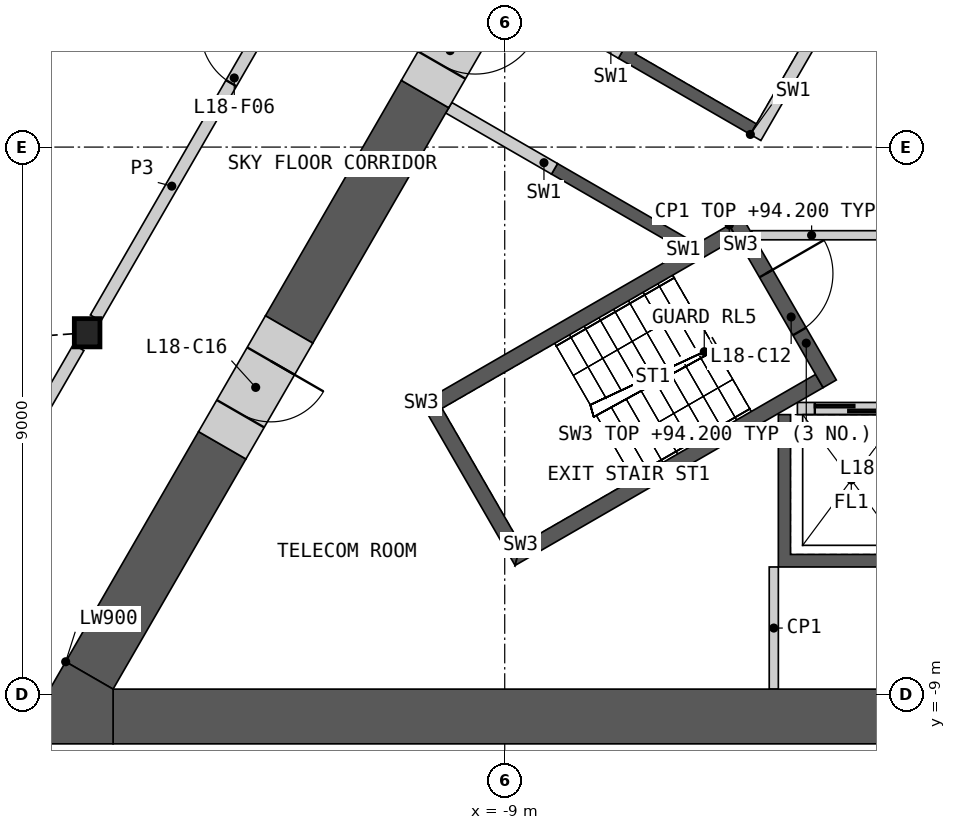
"""IFC4 building model, lengths in metres.
Left out: names, types, materials, properties, quantities, classifications, styles, units other than length and angle.
Written with IfcOpenShell. Run it as: python <this file> out.ifc"""

import sys

from ifc_helpers import new_model, si_unit, direction, frame, frame_2d, origin, origin_2d, place, context, subcontext, project, spatial, polyline, rectangle, i_section, outline, extrude, element, fill, save


model = new_model("IFC4")
c1 = context("Model", 3, precision=1e-05, world=origin(), true_north=direction((0.0, 1.0)))
c2 = subcontext(c1, "Body", "Model", "MODEL_VIEW")
j1 = project(units=[si_unit("LENGTHUNIT", "METRE"), si_unit("PLANEANGLEUNIT", "RADIAN")], contexts=[c1])
p1 = place(None, origin())
s1 = spatial("IfcSite", under=j1, at=p1, CompositionType="ELEMENT")
p2 = place(p1, origin())
s2 = spatial("IfcBuilding", under=s1, at=p2, CompositionType="ELEMENT")
p3 = place(p2, frame((0.0, 0.0, 84.6)))
s3 = spatial("IfcBuildingStorey", under=s2, at=p3, CompositionType="ELEMENT", Elevation=84.6)
p4 = place(p3, frame((-15.868, -3.054, 0.0), z_axis=(0.0, 0.0, 1.0), x_axis=(1.0, 0.0, 0.0)))
e1 = element("IfcColumn", 1, at=p4, inside=s3, PredefinedType="COLUMN", context=c2, shape_type="SweptSolid", body=[
    extrude(i_section(OverallWidth=0.421, OverallDepth=0.465, WebThickness=0.045, FlangeThickness=0.072, at=origin_2d()), origin(), (0.0, 0.0, 1.0), 10.0),
])
p5 = place(p3, origin())
e2 = element("IfcWall", 2, at=p5, inside=s3, PredefinedType="SHEAR", context=c2, shape_type="SweptSolid", body=[
    extrude(outline(polyline([(4.5, -4.4), (4.5, -6.906), (-4.5, -6.906), (-4.5, -4.4), (-4.3, -4.4), (-4.3, -6.7), (-2.3, -6.7), (-2.3, -4.4), (-2.1, -4.4), (-2.1, -6.7), (-0.1, -6.7), (-0.1, -4.4), (0.1, -4.4), (0.1, -6.7), (2.1, -6.7), (2.1, -4.4), (2.3, -4.4), (2.3, -6.7), (4.3, -6.7), (4.3, -4.4), (4.5, -4.4)])), origin(), (0.0, 0.0, 1.0), 9.6),
])
p6 = place(p3, frame((-4.187, -4.3, 0.0), z_axis=(0.0, 0.0, 1.0), x_axis=(1.0, 0.0, 0.0)))
e3 = element("IfcWall", 3, at=p6, inside=s3, PredefinedType="SOLIDWALL", context=c2, shape_type="SweptSolid", body=[
    extrude(rectangle(XDim=8.373, YDim=0.2, at=frame_2d((4.187, 0.0))), origin(), (0.0, 0.0, 1.0), 9.6),
])
p7 = place(p6, frame((0.287, 0.0, 0.0)))
e4 = element("IfcOpeningElement", 4, at=p7, cuts=e3, PredefinedType="OPENING", context=c2, shape_type="SweptSolid", body=[
    extrude(rectangle(XDim=1.2, YDim=2.1, at=frame_2d((0.6, 1.05))), frame((0.0, 0.11, 0.0), z_axis=(0.0, -1.0, 0.0), x_axis=(1.0, 0.0, 0.0)), (0.0, 0.0, 1.0), 0.22),
])
p8 = place(p6, frame((2.387, 0.0, 0.0)))
e5 = element("IfcOpeningElement", 5, at=p8, cuts=e3, PredefinedType="OPENING", context=c2, shape_type="SweptSolid", body=[
    extrude(rectangle(XDim=1.4, YDim=2.1, at=frame_2d((0.7, 1.05))), frame((0.0, 0.11, 0.0), z_axis=(0.0, -1.0, 0.0), x_axis=(1.0, 0.0, 0.0)), (0.0, 0.0, 1.0), 0.22),
])
p9 = place(p6, frame((4.737, 0.0, 0.0)))
e6 = element("IfcOpeningElement", 6, at=p9, cuts=e3, PredefinedType="OPENING", context=c2, shape_type="SweptSolid", body=[
    extrude(rectangle(XDim=1.1, YDim=2.1, at=frame_2d((0.55, 1.05))), frame((0.0, 0.11, 0.0), z_axis=(0.0, -1.0, 0.0), x_axis=(1.0, 0.0, 0.0)), (0.0, 0.0, 1.0), 0.22),
])
p10 = place(p6, frame((6.887, 0.0, 0.0)))
e7 = element("IfcOpeningElement", 7, at=p10, cuts=e3, PredefinedType="OPENING", context=c2, shape_type="SweptSolid", body=[
    extrude(rectangle(XDim=1.2, YDim=2.1, at=frame_2d((0.6, 1.05))), frame((0.0, 0.11, 0.0), z_axis=(0.0, -1.0, 0.0), x_axis=(1.0, 0.0, 0.0)), (0.0, 0.0, 1.0), 0.22),
])
p11 = place(p3, origin())
e8 = element("IfcWall", 8, at=p11, inside=s3, PredefinedType="SHEAR", context=c2, shape_type="SweptSolid", body=[
    extrude(outline(polyline([(-6.061, -1.697), (-8.231, -0.444), (-8.131, -0.271), (-5.96, -1.524), (-6.061, -1.697)])), origin(), (0.0, 0.0, 1.0), 9.6),
])
p12 = place(p3, origin())
e9 = element("IfcWall", 9, at=p12, inside=s3, PredefinedType="SHEAR", context=c2, shape_type="SweptSolid", body=[
    extrude(outline(polyline([(-4.96, 0.208), (-7.131, 1.461), (-5.931, 3.54), (-3.76, 2.287), (-3.861, 2.113), (-5.852, 3.263), (-6.852, 1.531), (-4.861, 0.381), (-4.96, 0.208)])), origin(), (0.0, 0.0, 1.0), 9.6),
])
p13 = place(p3, frame((-1.631, 5.776, 0.0), z_axis=(0.0, 0.0, 1.0), x_axis=(-0.499992876559, -0.866029516466, 0.0)))
e10 = element("IfcWall", 10, at=p13, inside=s3, PredefinedType="SOLIDWALL", context=c2, shape_type="SweptSolid", body=[
    extrude(rectangle(XDim=6.486, YDim=0.2, at=frame_2d((3.243, 0.0))), origin(), (0.0, 0.0, 1.0), 9.6),
])
p14 = place(p13, frame((0.437, 0.0, 0.0)))
e11 = element("IfcOpeningElement", 11, at=p14, cuts=e10, PredefinedType="OPENING", context=c2, shape_type="SweptSolid", body=[
    extrude(rectangle(XDim=0.9, YDim=2.1, at=frame_2d((0.45, 1.05))), frame((0.0, 0.11, 0.0), z_axis=(0.0, -1.0, 0.0), x_axis=(1.0, 0.0, 0.0)), (0.0, 0.0, 1.0), 0.22),
])
p15 = place(p13, frame((2.637, 0.0, 0.0)))
e12 = element("IfcOpeningElement", 12, at=p15, cuts=e10, PredefinedType="OPENING", context=c2, shape_type="SweptSolid", body=[
    extrude(rectangle(XDim=0.9, YDim=2.1, at=frame_2d((0.45, 1.05))), frame((0.0, 0.11, 0.0), z_axis=(0.0, -1.0, 0.0), x_axis=(1.0, 0.0, 0.0)), (0.0, 0.0, 1.0), 0.22),
])
p16 = place(p3, frame((-7.081, 1.548, 0.0), z_axis=(0.0, 0.0, 1.0), x_axis=(-0.865983199114, 0.50007309351, 0.0)))
e13 = element("IfcWall", 13, at=p16, inside=s3, PredefinedType="SHEAR", context=c2, shape_type="SweptSolid", body=[
    extrude(rectangle(XDim=2.009, YDim=0.2, at=frame_2d((1.004, 0.0))), origin(), (0.0, 0.0, 1.0), 9.6),
])
p17 = place(p3, frame((-8.181, -0.357, 0.0), z_axis=(0.0, 0.0, 1.0), x_axis=(-0.866035824272, 0.499981950752, 0.0)))
e14 = element("IfcWall", 14, at=p17, inside=s3, PredefinedType="SHEAR", context=c2, shape_type="SweptSolid", body=[
    extrude(rectangle(XDim=2.009, YDim=0.2, at=frame_2d((1.004, 0.0))), origin(), (0.0, 0.0, 1.0), 9.6),
])
p18 = place(p3, frame((-4.941, -1.45, 0.0), z_axis=(0.0, 0.0, 1.0), x_axis=(1.0, 0.0, 0.0)))
e15 = element("IfcWall", 15, at=p18, inside=s3, PredefinedType="PARTITIONING", context=c2, shape_type="SweptSolid", body=[
    extrude(rectangle(XDim=9.882, YDim=0.15, at=frame_2d((4.941, 0.0))), origin(), (0.0, 0.0, 1.0), 9.6),
])
p19 = place(p18, frame((4.391, 0.0, 0.0)))
e16 = element("IfcOpeningElement", 16, at=p19, cuts=e15, PredefinedType="OPENING", context=c2, shape_type="SweptSolid", body=[
    extrude(rectangle(XDim=1.1, YDim=2.1, at=frame_2d((0.55, 1.05))), frame((0.0, 0.085, 0.0), z_axis=(0.0, -1.0, 0.0), x_axis=(1.0, 0.0, 0.0)), (0.0, 0.0, 1.0), 0.17),
])
p20 = place(p3, origin())
e17 = element("IfcWall", 17, at=p20, inside=s3, PredefinedType="SHEAR", context=c2, shape_type="SweptSolid", body=[
    extrude(outline(polyline([(-5.307, -1.281), (-10.374, -4.206), (-10.032, -4.298), (-5.182, -1.498), (-5.307, -1.281)])), origin(), (0.0, 0.0, 1.0), 9.6),
])
p21 = place(p3, origin())
e18 = element("IfcWall", 18, at=p21, inside=s3, PredefinedType="SHEAR", context=c2, shape_type="SweptSolid", body=[
    extrude(outline(polyline([(-10.374, -4.206), (-8.83, -6.881), (-8.738, -6.539), (-10.032, -4.298), (-10.374, -4.206)])), origin(), (0.0, 0.0, 1.0), 9.6),
])
p22 = place(p3, origin())
e19 = element("IfcWall", 19, at=p22, inside=s3, PredefinedType="SHEAR", context=c2, shape_type="SweptSolid", body=[
    extrude(outline(polyline([(-8.738, -6.539), (-8.83, -6.881), (-3.763, -3.956), (-3.888, -3.739), (-8.738, -6.539)])), origin(), (0.0, 0.0, 1.0), 9.6),
])
p23 = place(p3, frame((-5.199, -1.219, 0.0), z_axis=(0.0, 0.0, 1.0), x_axis=(0.499982516597, -0.866035497597, 0.0)))
e20 = element("IfcWall", 20, at=p23, inside=s3, PredefinedType="SHEAR", context=c2, shape_type="SweptSolid", body=[
    extrude(rectangle(XDim=3.088, YDim=0.25, at=frame_2d((1.544, 0.0))), origin(), (0.0, 0.0, 1.0), 9.6),
])
p24 = place(p23, frame((0.994, 0.0, 0.0)))
e21 = element("IfcOpeningElement", 21, at=p24, cuts=e20, PredefinedType="OPENING", context=c2, shape_type="SweptSolid", body=[
    extrude(rectangle(XDim=1.1, YDim=2.1, at=frame_2d((0.55, 1.05))), frame((0.0, 0.135, 0.0), z_axis=(0.0, -1.0, 0.0), x_axis=(1.0, 0.0, 0.0)), (0.0, 0.0, 1.0), 0.27),
])
p25 = place(p3, frame((-4.575, -6.906, 0.0), z_axis=(0.0, 0.0, 1.0), x_axis=(0.0, -1.0, 0.0)))
e22 = element("IfcWall", 22, at=p25, inside=s3, PredefinedType="PARTITIONING", context=c2, shape_type="SweptSolid", body=[
    extrude(rectangle(XDim=2.009, YDim=0.15, at=frame_2d((1.004, 0.0))), origin(), (0.0, 0.0, 1.0), 9.6),
])
p26 = place(p3, frame((-15.441, -9.365, 0.0), z_axis=(0.0, 0.0, 1.0), x_axis=(1.0, 0.0, 0.0)))
e23 = element("IfcWall", 23, at=p26, inside=s3, PredefinedType="SHEAR", context=c2, shape_type="SweptSolid", body=[
    extrude(rectangle(XDim=14.341, YDim=0.9, at=frame_2d((7.17, 0.0))), origin(), (0.0, 0.0, 1.0), 9.6),
])
p27 = place(p3, frame((-10.31, 0.872, 0.0), z_axis=(0.0, 0.0, 1.0), x_axis=(-0.499991893987, -0.866030083742, 0.0)))
e24 = element("IfcWall", 24, at=p27, inside=s3, PredefinedType="SHEAR", context=c2, shape_type="SweptSolid", body=[
    extrude(rectangle(XDim=4.471, YDim=0.9, at=frame_2d((2.235, 0.0))), origin(), (0.0, 0.0, 1.0), 9.6),
])
p28 = place(p3, frame((-13.646, -4.905, 0.0), z_axis=(0.0, 0.0, 1.0), x_axis=(-0.499990005186, -0.866031174216, 0.0)))
e25 = element("IfcWall", 25, at=p28, inside=s3, PredefinedType="SHEAR", context=c2, shape_type="SweptSolid", body=[
    extrude(rectangle(XDim=4.371, YDim=0.9, at=frame_2d((2.185, 0.0))), origin(), (0.0, 0.0, 1.0), 9.6),
])
p29 = place(p3, origin())
e26 = element("IfcWall", 26, at=p29, inside=s3, PredefinedType="SHEAR", context=c2, shape_type="SweptSolid", body=[
    extrude(outline(polyline([(-16.221, -8.465), (-15.441, -8.915), (-15.441, -9.815), (-17.0, -9.815), (-16.221, -8.465)])), origin(), (0.0, 0.0, 1.0), 9.6),
])
p30 = place(p3, frame((-12.546, -3.0, 0.0), z_axis=(0.0, 0.0, 1.0), x_axis=(-0.499994660107, -0.866028486751, 0.0)))
e27 = element("IfcWall", 27, at=p30, inside=s3, PredefinedType="SHEAR", context=c2, shape_type="SweptSolid", body=[
    extrude(rectangle(XDim=2.2, YDim=0.9, at=frame_2d((1.1, 0.0))), origin(), (0.0, 0.0, 1.0), 9.6),
])
p31 = place(p30, frame((0.6, 0.0, 0.0)))
e28 = element("IfcOpeningElement", 28, at=p31, cuts=e27, PredefinedType="OPENING", context=c2, shape_type="SweptSolid", body=[
    extrude(rectangle(XDim=1.0, YDim=2.1, at=frame_2d((0.5, 1.05))), frame((0.0, 0.46, 0.0), z_axis=(0.0, -1.0, 0.0), x_axis=(1.0, 0.0, 0.0)), (0.0, 0.0, 1.0), 0.92),
])
p32 = place(p3, frame((-9.21, 2.777, 0.0), z_axis=(0.0, 0.0, 1.0), x_axis=(-0.500077893725, -0.86598042715, 0.0)))
e29 = element("IfcWall", 29, at=p32, inside=s3, PredefinedType="SHEAR", context=c2, shape_type="SweptSolid", body=[
    extrude(rectangle(XDim=2.2, YDim=0.9, at=frame_2d((1.1, 0.0))), origin(), (0.0, 0.0, 1.0), 9.6),
])
p33 = place(p32, frame((0.55, 0.0, 0.0)))
e30 = element("IfcOpeningElement", 30, at=p33, cuts=e29, PredefinedType="OPENING", context=c2, shape_type="SweptSolid", body=[
    extrude(rectangle(XDim=1.1, YDim=2.1, at=frame_2d((0.55, 1.05))), frame((0.0, 0.46, 0.0), z_axis=(0.0, -1.0, 0.0), x_axis=(1.0, 0.0, 0.0)), (0.0, 0.0, 1.0), 0.92),
])
p34 = place(p3, frame((-15.728, -2.811, 0.0), z_axis=(0.0, 0.0, 1.0), x_axis=(0.49999175339, 0.866030164915, 0.0)))
e31 = element("IfcWall", 31, at=p34, inside=s3, PredefinedType="PARTITIONING", context=c2, shape_type="SweptSolid", body=[
    extrude(rectangle(XDim=10.019, YDim=0.2, at=frame_2d((5.009, 0.0))), origin(), (0.0, 0.0, 1.0), 9.6),
])
p35 = place(p34, frame((4.459, 0.0, 0.0)))
e32 = element("IfcOpeningElement", 32, at=p35, cuts=e31, PredefinedType="OPENING", context=c2, shape_type="SweptSolid", body=[
    extrude(rectangle(XDim=1.0, YDim=2.1, at=frame_2d((0.5, 1.05))), frame((0.0, 0.11, 0.0), z_axis=(0.0, -1.0, 0.0), x_axis=(1.0, 0.0, 0.0)), (0.0, 0.0, 1.0), 0.22),
])
p36 = place(p3, frame((-19.244, -8.902, 0.0), z_axis=(0.0, 0.0, 1.0), x_axis=(0.499984737558, 0.86603421538, 0.0)))
e33 = element("IfcWall", 33, at=p36, inside=s3, PredefinedType="PARTITIONING", context=c2, shape_type="SweptSolid", body=[
    extrude(rectangle(XDim=6.473, YDim=0.2, at=frame_2d((3.236, 0.0))), origin(), (0.0, 0.0, 1.0), 9.6),
])
p37 = place(p7, origin())
e34 = element("IfcDoor", 34, at=p37, inside=s3, OperationType="SLIDING_TO_LEFT", PredefinedType="DOOR", context=c2, shape_type="SweptSolid", body=[
    extrude(rectangle(XDim=1.2, YDim=2.1, at=frame_2d((0.6, 1.05))), frame((0.0, 0.025, 0.0), z_axis=(0.0, -1.0, 0.0), x_axis=(1.0, 0.0, 0.0)), (0.0, 0.0, 1.0), 0.05),
])
fill(e4, e34)
p38 = place(p24, origin())
e35 = element("IfcDoor", 35, at=p38, inside=s3, OperationType="SINGLE_SWING_LEFT", PredefinedType="DOOR", context=c2, shape_type="SweptSolid", body=[
    extrude(rectangle(XDim=1.1, YDim=2.1, at=frame_2d((0.55, 1.05))), frame((0.0, 0.025, 0.0), z_axis=(0.0, -1.0, 0.0), x_axis=(1.0, 0.0, 0.0)), (0.0, 0.0, 1.0), 0.05),
])
fill(e21, e35)
p39 = place(p31, origin())
e36 = element("IfcDoor", 36, at=p39, inside=s3, OperationType="SINGLE_SWING_LEFT", PredefinedType="DOOR", context=c2, shape_type="SweptSolid", body=[
    extrude(rectangle(XDim=1.0, YDim=2.1, at=frame_2d((0.5, 1.05))), frame((0.0, 0.205, 0.0), z_axis=(0.0, -1.0, 0.0), x_axis=(1.0, 0.0, 0.0)), (0.0, 0.0, 1.0), 0.05),
])
fill(e28, e36)
p40 = place(p33, origin())
e37 = element("IfcDoor", 37, at=p40, inside=s3, OperationType="SINGLE_SWING_LEFT", PredefinedType="DOOR", context=c2, shape_type="SweptSolid", body=[
    extrude(rectangle(XDim=1.1, YDim=2.1, at=frame_2d((0.55, 1.05))), frame((0.0, 0.205, 0.0), z_axis=(0.0, -1.0, 0.0), x_axis=(1.0, 0.0, 0.0)), (0.0, 0.0, 1.0), 0.05),
])
fill(e30, e37)
p41 = place(p35, origin())
e38 = element("IfcDoor", 38, at=p41, inside=s3, OperationType="SINGLE_SWING_RIGHT", PredefinedType="DOOR", context=c2, shape_type="SweptSolid", body=[
    extrude(rectangle(XDim=1.0, YDim=2.1, at=frame_2d((0.5, 1.05))), frame((0.0, 0.025, 0.0), z_axis=(0.0, -1.0, 0.0), x_axis=(1.0, 0.0, 0.0)), (0.0, 0.0, 1.0), 0.05),
])
fill(e32, e38)
save(model, sys.argv[1])
